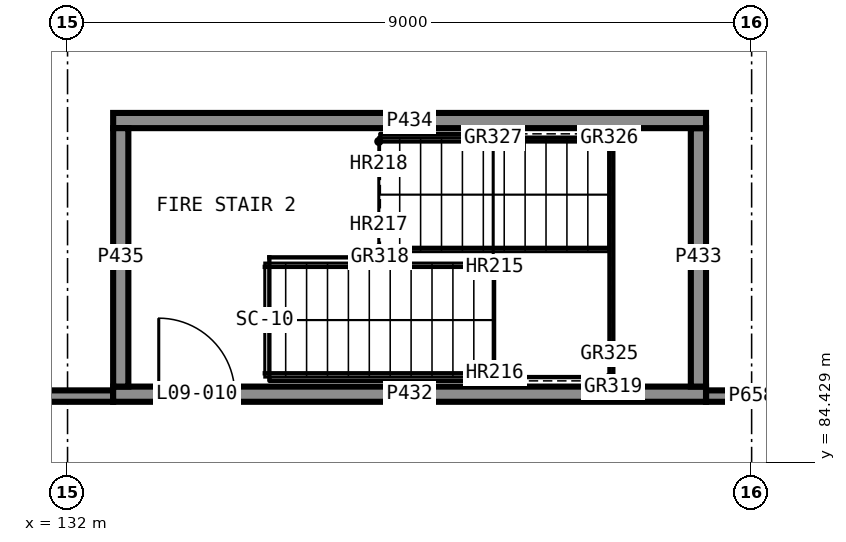
"""IFC4 building model, lengths in metres.
Left out: names, types, materials, properties, quantities, classifications, styles, units other than length and angle.
Written with IfcOpenShell. Run it as: python <this file> out.ifc"""

import sys

from ifc_helpers import new_model, si_unit, direction, frame, frame_2d, origin, place, context, subcontext, project, spatial, rectangle, extrude, element, fill, save


model = new_model("IFC4")
c1 = context("Model", 3, precision=1e-05, world=origin(), true_north=direction((0.0, 1.0)))
c2 = subcontext(c1, "Body", "Model", "MODEL_VIEW")
j1 = project(units=[si_unit("LENGTHUNIT", "METRE"), si_unit("PLANEANGLEUNIT", "RADIAN")], contexts=[c1])
p1 = place(None, origin())
s1 = spatial("IfcSite", under=j1, at=p1, CompositionType="ELEMENT")
p2 = place(p1, origin())
s2 = spatial("IfcBuilding", under=s1, at=p2, CompositionType="ELEMENT")
p3 = place(p2, frame((0.0, 0.0, 37.5)))
s3 = spatial("IfcBuildingStorey", under=s2, at=p3, CompositionType="ELEMENT", Elevation=37.5)
p4 = place(p3, frame((132.6, 85.325, 0.0), z_axis=(0.0, 0.0, 1.0), x_axis=(1.0, 0.0, 0.0)))
e1 = element("IfcWall", 1, at=p4, inside=s3, PredefinedType="SHEAR", context=c2, shape_type="SweptSolid", body=[
    extrude(rectangle(XDim=7.8, YDim=0.2, at=frame_2d((3.9, 0.0))), origin(), (0.0, 0.0, 1.0), 3.58),
])
p5 = place(p4, frame((0.6, 0.0, 0.0)))
e2 = element("IfcOpeningElement", 2, at=p5, cuts=e1, PredefinedType="OPENING", context=c2, shape_type="SweptSolid", body=[
    extrude(rectangle(XDim=1.0, YDim=2.1, at=frame_2d((0.5, 1.05))), frame((0.0, 0.11, 0.0), z_axis=(0.0, -1.0, 0.0), x_axis=(1.0, 0.0, 0.0)), (0.0, 0.0, 1.0), 0.22),
])
p6 = place(p3, frame((140.3, 85.425, 0.0), z_axis=(0.0, 0.0, 1.0), x_axis=(0.0, 1.0, 0.0)))
e3 = element("IfcWall", 3, at=p6, inside=s3, PredefinedType="SHEAR", context=c2, shape_type="SweptSolid", body=[
    extrude(rectangle(XDim=3.4, YDim=0.2, at=frame_2d((1.7, 0.0))), origin(), (0.0, 0.0, 1.0), 3.58),
])
p7 = place(p3, frame((140.4, 88.925, 0.0), z_axis=(0.0, 0.0, 1.0), x_axis=(-1.0, 0.0, 0.0)))
e4 = element("IfcWall", 4, at=p7, inside=s3, PredefinedType="SHEAR", context=c2, shape_type="SweptSolid", body=[
    extrude(rectangle(XDim=7.8, YDim=0.2, at=frame_2d((3.9, 0.0))), origin(), (0.0, 0.0, 1.0), 3.58),
])
p8 = place(p3, frame((132.7, 88.825, 0.0), z_axis=(0.0, 0.0, 1.0), x_axis=(0.0, -1.0, 0.0)))
e5 = element("IfcWall", 5, at=p8, inside=s3, PredefinedType="SHEAR", context=c2, shape_type="SweptSolid", body=[
    extrude(rectangle(XDim=3.4, YDim=0.2, at=frame_2d((1.7, 0.0))), origin(), (0.0, 0.0, 1.0), 3.58),
])
p9 = place(p3, frame((122.7, 85.3, 0.0), z_axis=(0.0, 0.0, 1.0), x_axis=(1.0, 0.0, 0.0)))
e6 = element("IfcWall", 6, at=p9, inside=s3, PredefinedType="PARTITIONING", context=c2, shape_type="SweptSolid", body=[
    extrude(rectangle(XDim=9.9, YDim=0.15, at=frame_2d((4.95, 0.0))), origin(), (0.0, 0.0, 1.0), 3.58),
])
p10 = place(p9, frame((2.8, 0.0, 0.0)))
e7 = element("IfcOpeningElement", 7, at=p10, cuts=e6, PredefinedType="OPENING", context=c2, shape_type="SweptSolid", body=[
    extrude(rectangle(XDim=1.0, YDim=2.1, at=frame_2d((0.5, 1.05))), frame((0.0, 0.085, 0.0), z_axis=(0.0, -1.0, 0.0), x_axis=(1.0, 0.0, 0.0)), (0.0, 0.0, 1.0), 0.17),
])
p11 = place(p3, frame((140.4, 85.3, 0.0), z_axis=(0.0, 0.0, 1.0), x_axis=(1.0, 0.0, 0.0)))
e8 = element("IfcWall", 8, at=p11, inside=s3, PredefinedType="PARTITIONING", context=c2, shape_type="SweptSolid", body=[
    extrude(rectangle(XDim=1.2, YDim=0.15, at=frame_2d((0.6, 0.0))), origin(), (0.0, 0.0, 1.0), 3.58),
])
p12 = place(p5, origin())
e9 = element("IfcDoor", 9, at=p12, inside=s3, OperationType="SINGLE_SWING_RIGHT", PredefinedType="DOOR", context=c2, shape_type="SweptSolid", body=[
    extrude(rectangle(XDim=1.0, YDim=2.1, at=frame_2d((0.5, 1.05))), frame((0.0, 0.025, 0.0), z_axis=(0.0, -1.0, 0.0), x_axis=(1.0, 0.0, 0.0)), (0.0, 0.0, 1.0), 0.05),
])
fill(e2, e9)
save(model, sys.argv[1])
